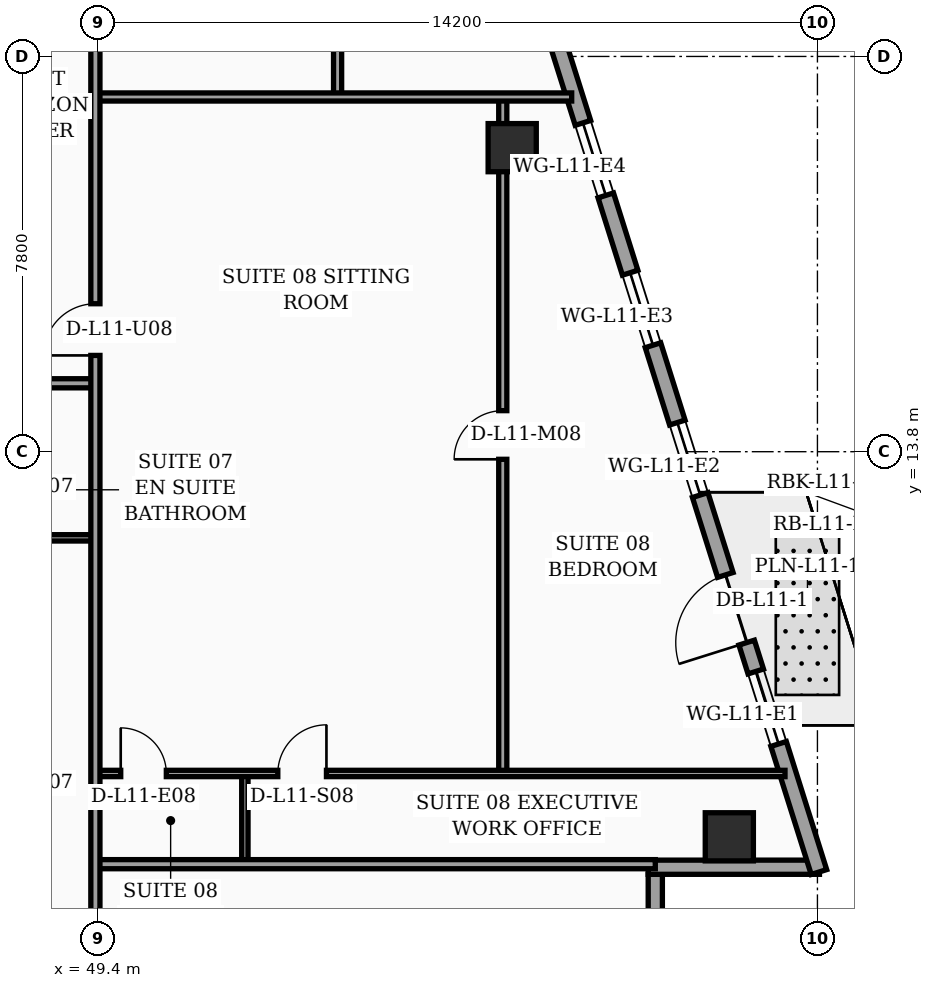
"""IFC4 building model, lengths in metres.
Left out: names, types, materials, properties, quantities, classifications, styles, units other than length and angle.
Written with IfcOpenShell. Run it as: python <this file> out.ifc"""

import sys

from ifc_helpers import new_model, si_unit, direction, frame, frame_2d, origin, origin_2d, place, context, subcontext, project, spatial, rectangle, hollow_rectangle, extrude, element, fill, save


model = new_model("IFC4")
c1 = context("Model", 3, precision=1e-05, world=origin(), true_north=direction((0.0, 1.0)))
c2 = subcontext(c1, "Body", "Model", "MODEL_VIEW")
j1 = project(units=[si_unit("LENGTHUNIT", "METRE"), si_unit("PLANEANGLEUNIT", "RADIAN")], contexts=[c1])
p1 = place(None, origin())
s1 = spatial("IfcSite", under=j1, at=p1, CompositionType="ELEMENT")
p2 = place(p1, origin())
s2 = spatial("IfcBuilding", under=s1, at=p2, CompositionType="ELEMENT")
p3 = place(p2, frame((0.0, 0.0, 50.8)))
s3 = spatial("IfcBuildingStorey", under=s2, at=p3, CompositionType="ELEMENT", Elevation=50.8)
for number, where, z_axis, x_axis in (
    (1, (61.861, 6.2, 0.0), (0.0, 0.0, 1.0), (1.0, 0.0, 0.0)),
    (2, (57.576, 19.8, 0.0), (0.0, 0.0, 1.0), (1.0, 0.0, 0.0)),
):
    element("IfcColumn", number, at=place(p3, frame(where, z_axis=z_axis, x_axis=x_axis)), inside=s3, PredefinedType="COLUMN", context=c2, shape_type="SweptSolid", body=[
        extrude(hollow_rectangle(XDim=0.95, YDim=0.95, WallThickness=0.04, at=origin_2d()), origin(), (0.0, 0.0, 1.0), 3.56),
    ])
p4 = place(p3, frame((60.4, 2.52, 0.0), z_axis=(0.0, 0.0, 1.0), x_axis=(0.0, 1.0, 0.0)))
e3 = element("IfcWall", 3, at=p4, inside=s3, PredefinedType="SOLIDWALL", context=c2, shape_type="SweptSolid", body=[
    extrude(rectangle(XDim=2.94, YDim=0.28, at=frame_2d((1.47, 0.0))), origin(), (0.0, 0.0, 1.0), 3.04),
])
p5 = place(p3, frame((60.26, 5.6, 0.0), z_axis=(0.0, 0.0, 1.0), x_axis=(1.0, 0.0, 0.0)))
e4 = element("IfcWall", 4, at=p5, inside=s3, PredefinedType="SOLIDWALL", context=c2, shape_type="SweptSolid", body=[
    extrude(rectangle(XDim=3.38, YDim=0.28, at=frame_2d((1.69, 0.0))), origin(), (0.0, 0.0, 1.0), 3.04),
])
p6 = place(p3, frame((63.63, 5.505, 0.0), z_axis=(0.0, 0.0, 1.0), x_axis=(-0.300501856448, 0.953781229775, 0.0)))
e5 = element("IfcWall", 5, at=p6, inside=s3, PredefinedType="SOLIDWALL", context=c2, shape_type="SweptSolid", body=[
    extrude(rectangle(XDim=30.814, YDim=0.32, at=frame_2d((15.407, 0.0))), origin(), (0.0, 0.0, 1.0), 3.56),
])
p7 = place(p6, frame((4.747, 0.0, 0.0)))
e6 = element("IfcOpeningElement", 6, at=p7, cuts=e5, PredefinedType="OPENING", context=c2, shape_type="SweptSolid", body=[
    extrude(rectangle(XDim=1.4, YDim=2.25, at=frame_2d((0.7, 1.125))), frame((0.0, 0.17, 0.0), z_axis=(0.0, -1.0, 0.0), x_axis=(1.0, 0.0, 0.0)), (0.0, 0.0, 1.0), 0.34),
])
p8 = place(p6, frame((2.65, 0.0, 0.75)))
e7 = element("IfcOpeningElement", 7, at=p8, cuts=e5, PredefinedType="OPENING", context=c2, shape_type="SweptSolid", body=[
    extrude(rectangle(XDim=1.5, YDim=1.6, at=frame_2d((0.75, 0.8))), frame((0.0, 0.17, 0.0), z_axis=(0.0, -1.0, 0.0), x_axis=(1.0, 0.0, 0.0)), (0.0, 0.0, 1.0), 0.34),
])
p9 = place(p6, frame((7.8, 0.0, 0.75)))
e8 = element("IfcOpeningElement", 8, at=p9, cuts=e5, PredefinedType="OPENING", context=c2, shape_type="SweptSolid", body=[
    extrude(rectangle(XDim=1.5, YDim=1.6, at=frame_2d((0.75, 0.8))), frame((0.0, 0.17, 0.0), z_axis=(0.0, -1.0, 0.0), x_axis=(1.0, 0.0, 0.0)), (0.0, 0.0, 1.0), 0.34),
])
p10 = place(p6, frame((10.9, 0.0, 0.75)))
e9 = element("IfcOpeningElement", 9, at=p10, cuts=e5, PredefinedType="OPENING", context=c2, shape_type="SweptSolid", body=[
    extrude(rectangle(XDim=1.5, YDim=1.6, at=frame_2d((0.75, 0.8))), frame((0.0, 0.17, 0.0), z_axis=(0.0, -1.0, 0.0), x_axis=(1.0, 0.0, 0.0)), (0.0, 0.0, 1.0), 0.34),
])
p11 = place(p6, frame((14.0, 0.0, 0.75)))
e10 = element("IfcOpeningElement", 10, at=p11, cuts=e5, PredefinedType="OPENING", context=c2, shape_type="SweptSolid", body=[
    extrude(rectangle(XDim=1.5, YDim=1.6, at=frame_2d((0.75, 0.8))), frame((0.0, 0.17, 0.0), z_axis=(0.0, -1.0, 0.0), x_axis=(1.0, 0.0, 0.0)), (0.0, 0.0, 1.0), 0.34),
])
p12 = place(p6, frame((17.1, 0.0, 0.75)))
e11 = element("IfcOpeningElement", 11, at=p12, cuts=e5, PredefinedType="OPENING", context=c2, shape_type="SweptSolid", body=[
    extrude(rectangle(XDim=1.5, YDim=1.6, at=frame_2d((0.75, 0.8))), frame((0.0, 0.17, 0.0), z_axis=(0.0, -1.0, 0.0), x_axis=(1.0, 0.0, 0.0)), (0.0, 0.0, 1.0), 0.34),
])
p13 = place(p6, frame((20.2, 0.0, 0.75)))
e12 = element("IfcOpeningElement", 12, at=p13, cuts=e5, PredefinedType="OPENING", context=c2, shape_type="SweptSolid", body=[
    extrude(rectangle(XDim=1.5, YDim=1.6, at=frame_2d((0.75, 0.8))), frame((0.0, 0.17, 0.0), z_axis=(0.0, -1.0, 0.0), x_axis=(1.0, 0.0, 0.0)), (0.0, 0.0, 1.0), 0.34),
])
p14 = place(p6, frame((26.4, 0.0, 0.75)))
e13 = element("IfcOpeningElement", 13, at=p14, cuts=e5, PredefinedType="OPENING", context=c2, shape_type="SweptSolid", body=[
    extrude(rectangle(XDim=1.5, YDim=1.6, at=frame_2d((0.75, 0.8))), frame((0.0, 0.17, 0.0), z_axis=(0.0, -1.0, 0.0), x_axis=(1.0, 0.0, 0.0)), (0.0, 0.0, 1.0), 0.34),
])
p15 = place(p3, frame((47.42, 12.1, 0.0), z_axis=(0.0, 0.0, 1.0), x_axis=(1.0, 0.0, 0.0)))
e14 = element("IfcWall", 14, at=p15, inside=s3, PredefinedType="PARTITIONING", context=c2, shape_type="SweptSolid", body=[
    extrude(rectangle(XDim=1.93, YDim=0.125, at=frame_2d((0.965, 0.0))), origin(), (0.0, 0.0, 1.0), 2.84),
])
p16 = place(p3, frame((32.4, 15.15, 0.0), z_axis=(0.0, 0.0, 1.0), x_axis=(1.0, 0.0, 0.0)))
e15 = element("IfcWall", 15, at=p16, inside=s3, PredefinedType="PARTITIONING", context=c2, shape_type="SweptSolid", body=[
    extrude(rectangle(XDim=16.95, YDim=0.18, at=frame_2d((8.475, 0.0))), origin(), (0.0, 0.0, 1.0), 2.84),
])
p17 = place(p16, frame((1.99, 0.0, 0.0)))
e16 = element("IfcOpeningElement", 16, at=p17, cuts=e15, PredefinedType="OPENING", context=c2, shape_type="SweptSolid", body=[
    extrude(rectangle(XDim=1.02, YDim=2.2, at=frame_2d((0.51, 1.1))), frame((0.0, 0.1, 0.0), z_axis=(0.0, -1.0, 0.0), x_axis=(1.0, 0.0, 0.0)), (0.0, 0.0, 1.0), 0.2),
])
p18 = place(p16, frame((7.58, 0.0, 0.0)))
e17 = element("IfcOpeningElement", 17, at=p18, cuts=e15, PredefinedType="OPENING", context=c2, shape_type="SweptSolid", body=[
    extrude(rectangle(XDim=1.02, YDim=2.2, at=frame_2d((0.51, 1.1))), frame((0.0, 0.1, 0.0), z_axis=(0.0, -1.0, 0.0), x_axis=(1.0, 0.0, 0.0)), (0.0, 0.0, 1.0), 0.2),
])
p19 = place(p16, frame((12.69, 0.0, 0.0)))
e18 = element("IfcOpeningElement", 18, at=p19, cuts=e15, PredefinedType="OPENING", context=c2, shape_type="SweptSolid", body=[
    extrude(rectangle(XDim=1.02, YDim=2.2, at=frame_2d((0.51, 1.1))), frame((0.0, 0.1, 0.0), z_axis=(0.0, -1.0, 0.0), x_axis=(1.0, 0.0, 0.0)), (0.0, 0.0, 1.0), 0.2),
])
p20 = place(p3, frame((52.3, 5.66, 0.0), z_axis=(0.0, 0.0, 1.0), x_axis=(0.0, 1.0, 0.0)))
e19 = element("IfcWall", 19, at=p20, inside=s3, PredefinedType="PARTITIONING", context=c2, shape_type="SweptSolid", body=[
    extrude(rectangle(XDim=1.79, YDim=0.125, at=frame_2d((0.895, 0.0))), origin(), (0.0, 0.0, 1.0), 3.56),
])
p21 = place(p3, frame((57.39, 7.45, 0.0), z_axis=(0.0, 0.0, 1.0), x_axis=(0.0, 1.0, 0.0)))
e20 = element("IfcWall", 20, at=p21, inside=s3, PredefinedType="PARTITIONING", context=c2, shape_type="SweptSolid", body=[
    extrude(rectangle(XDim=13.35, YDim=0.16, at=frame_2d((6.675, 0.0))), origin(), (0.0, 0.0, 1.0), 2.84),
])
p22 = place(p21, frame((6.2, 0.0, 0.0)))
e21 = element("IfcOpeningElement", 21, at=p22, cuts=e20, PredefinedType="OPENING", context=c2, shape_type="SweptSolid", body=[
    extrude(rectangle(XDim=0.96, YDim=2.2, at=frame_2d((0.48, 1.1))), frame((0.0, 0.09, 0.0), z_axis=(0.0, -1.0, 0.0), x_axis=(1.0, 0.0, 0.0)), (0.0, 0.0, 1.0), 0.18),
])
p23 = place(p3, frame((49.35, 7.45, 0.0), z_axis=(0.0, 0.0, 1.0), x_axis=(1.0, 0.0, 0.0)))
e22 = element("IfcWall", 22, at=p23, inside=s3, PredefinedType="PARTITIONING", context=c2, shape_type="SweptSolid", body=[
    extrude(rectangle(XDim=13.61, YDim=0.125, at=frame_2d((6.805, 0.0))), origin(), (0.0, 0.0, 1.0), 3.04),
])
p24 = place(p23, frame((0.5, 0.0, 0.0)))
e23 = element("IfcOpeningElement", 23, at=p24, cuts=e22, PredefinedType="OPENING", context=c2, shape_type="SweptSolid", body=[
    extrude(rectangle(XDim=0.9, YDim=2.15, at=frame_2d((0.45, 1.075))), frame((0.0, 0.073, 0.0), z_axis=(0.0, -1.0, 0.0), x_axis=(1.0, 0.0, 0.0)), (0.0, 0.0, 1.0), 0.145),
])
p25 = place(p23, frame((3.6, 0.0, 0.0)))
e24 = element("IfcOpeningElement", 24, at=p25, cuts=e22, PredefinedType="OPENING", context=c2, shape_type="SweptSolid", body=[
    extrude(rectangle(XDim=0.96, YDim=2.2, at=frame_2d((0.48, 1.1))), frame((0.0, 0.073, 0.0), z_axis=(0.0, -1.0, 0.0), x_axis=(1.0, 0.0, 0.0)), (0.0, 0.0, 1.0), 0.145),
])
p26 = place(p3, frame((49.35, 5.66, 0.0), z_axis=(0.0, 0.0, 1.0), x_axis=(1.0, 0.0, 0.0)))
e25 = element("IfcWall", 25, at=p26, inside=s3, PredefinedType="PARTITIONING", context=c2, shape_type="SweptSolid", body=[
    extrude(rectangle(XDim=11.05, YDim=0.18, at=frame_2d((5.525, 0.0))), origin(), (0.0, 0.0, 1.0), 2.84),
])
p27 = place(p3, frame((54.13, 20.8, 0.0), z_axis=(0.0, 0.0, 1.0), x_axis=(0.0, 1.0, 0.0)))
e26 = element("IfcWall", 26, at=p27, inside=s3, PredefinedType="PARTITIONING", context=c2, shape_type="SweptSolid", body=[
    extrude(rectangle(XDim=7.35, YDim=0.16, at=frame_2d((3.675, 0.0))), origin(), (0.0, 0.0, 1.0), 3.19),
])
p28 = place(p27, frame((3.19, 0.0, 0.0)))
e27 = element("IfcOpeningElement", 27, at=p28, cuts=e26, PredefinedType="OPENING", context=c2, shape_type="SweptSolid", body=[
    extrude(rectangle(XDim=0.96, YDim=2.2, at=frame_2d((0.48, 1.1))), frame((0.0, 0.09, 0.0), z_axis=(0.0, -1.0, 0.0), x_axis=(1.0, 0.0, 0.0)), (0.0, 0.0, 1.0), 0.18),
])
p29 = place(p3, frame((49.35, 20.8, 0.0), z_axis=(0.0, 0.0, 1.0), x_axis=(1.0, 0.0, 0.0)))
e28 = element("IfcWall", 28, at=p29, inside=s3, PredefinedType="PARTITIONING", context=c2, shape_type="SweptSolid", body=[
    extrude(rectangle(XDim=9.4, YDim=0.16, at=frame_2d((4.7, 0.0))), origin(), (0.0, 0.0, 1.0), 3.04),
])
p30 = place(p3, frame((49.35, 2.44, 0.0), z_axis=(0.0, 0.0, 1.0), x_axis=(0.0, 1.0, 0.0)))
e29 = element("IfcWall", 29, at=p30, inside=s3, PredefinedType="PARTITIONING", context=c2, shape_type="SweptSolid", body=[
    extrude(rectangle(XDim=27.84, YDim=0.18, at=frame_2d((13.92, 0.0))), origin(), (0.0, 0.0, 1.0), 2.84),
])
p31 = place(p30, frame((13.26, 0.0, 0.0)))
e30 = element("IfcOpeningElement", 30, at=p31, cuts=e29, PredefinedType="OPENING", context=c2, shape_type="SweptSolid", body=[
    extrude(rectangle(XDim=1.02, YDim=2.2, at=frame_2d((0.51, 1.1))), frame((0.0, 0.1, 0.0), z_axis=(0.0, -1.0, 0.0), x_axis=(1.0, 0.0, 0.0)), (0.0, 0.0, 1.0), 0.2),
])
p32 = place(p30, frame((21.52, 0.0, 0.0)))
e31 = element("IfcOpeningElement", 31, at=p32, cuts=e29, PredefinedType="OPENING", context=c2, shape_type="SweptSolid", body=[
    extrude(rectangle(XDim=1.02, YDim=2.2, at=frame_2d((0.51, 1.1))), frame((0.0, 0.1, 0.0), z_axis=(0.0, -1.0, 0.0), x_axis=(1.0, 0.0, 0.0)), (0.0, 0.0, 1.0), 0.2),
])
p33 = place(p7, origin())
e32 = element("IfcDoor", 32, at=p33, inside=s3, OperationType="SINGLE_SWING_LEFT", PredefinedType="DOOR", context=c2, shape_type="SweptSolid", body=[
    extrude(rectangle(XDim=1.4, YDim=2.25, at=frame_2d((0.7, 1.125))), frame((0.0, 0.025, 0.0), z_axis=(0.0, -1.0, 0.0), x_axis=(1.0, 0.0, 0.0)), (0.0, 0.0, 1.0), 0.05),
])
fill(e6, e32)
p34 = place(p8, origin())
e33 = element("IfcWindow", 33, at=p34, inside=s3, PartitioningType="SINGLE_PANEL", PredefinedType="WINDOW", context=c2, shape_type="SweptSolid", body=[
    extrude(rectangle(XDim=1.5, YDim=1.6, at=frame_2d((0.75, 0.8))), frame((0.0, 0.03, 0.0), z_axis=(0.0, -1.0, 0.0), x_axis=(1.0, 0.0, 0.0)), (0.0, 0.0, 1.0), 0.06),
])
fill(e7, e33)
p35 = place(p9, origin())
e34 = element("IfcWindow", 34, at=p35, inside=s3, PartitioningType="SINGLE_PANEL", PredefinedType="WINDOW", context=c2, shape_type="SweptSolid", body=[
    extrude(rectangle(XDim=1.5, YDim=1.6, at=frame_2d((0.75, 0.8))), frame((0.0, 0.03, 0.0), z_axis=(0.0, -1.0, 0.0), x_axis=(1.0, 0.0, 0.0)), (0.0, 0.0, 1.0), 0.06),
])
fill(e8, e34)
p36 = place(p10, origin())
e35 = element("IfcWindow", 35, at=p36, inside=s3, PartitioningType="SINGLE_PANEL", PredefinedType="WINDOW", context=c2, shape_type="SweptSolid", body=[
    extrude(rectangle(XDim=1.5, YDim=1.6, at=frame_2d((0.75, 0.8))), frame((0.0, 0.03, 0.0), z_axis=(0.0, -1.0, 0.0), x_axis=(1.0, 0.0, 0.0)), (0.0, 0.0, 1.0), 0.06),
])
fill(e9, e35)
p37 = place(p11, origin())
e36 = element("IfcWindow", 36, at=p37, inside=s3, PartitioningType="SINGLE_PANEL", PredefinedType="WINDOW", context=c2, shape_type="SweptSolid", body=[
    extrude(rectangle(XDim=1.5, YDim=1.6, at=frame_2d((0.75, 0.8))), frame((0.0, 0.03, 0.0), z_axis=(0.0, -1.0, 0.0), x_axis=(1.0, 0.0, 0.0)), (0.0, 0.0, 1.0), 0.06),
])
fill(e10, e36)
p38 = place(p22, origin())
e37 = element("IfcDoor", 37, at=p38, inside=s3, OperationType="SINGLE_SWING_LEFT", PredefinedType="DOOR", context=c2, shape_type="SweptSolid", body=[
    extrude(rectangle(XDim=0.96, YDim=2.2, at=frame_2d((0.48, 1.1))), frame((0.0, 0.025, 0.0), z_axis=(0.0, -1.0, 0.0), x_axis=(1.0, 0.0, 0.0)), (0.0, 0.0, 1.0), 0.05),
])
fill(e21, e37)
p39 = place(p24, origin())
e38 = element("IfcDoor", 38, at=p39, inside=s3, OperationType="SINGLE_SWING_LEFT", PredefinedType="DOOR", context=c2, shape_type="SweptSolid", body=[
    extrude(rectangle(XDim=0.9, YDim=2.15, at=frame_2d((0.45, 1.075))), frame((0.0, 0.025, 0.0), z_axis=(0.0, -1.0, 0.0), x_axis=(1.0, 0.0, 0.0)), (0.0, 0.0, 1.0), 0.05),
])
fill(e23, e38)
p40 = place(p25, origin())
e39 = element("IfcDoor", 39, at=p40, inside=s3, OperationType="SINGLE_SWING_RIGHT", PredefinedType="DOOR", context=c2, shape_type="SweptSolid", body=[
    extrude(rectangle(XDim=0.96, YDim=2.2, at=frame_2d((0.48, 1.1))), frame((0.0, 0.025, 0.0), z_axis=(0.0, -1.0, 0.0), x_axis=(1.0, 0.0, 0.0)), (0.0, 0.0, 1.0), 0.05),
])
fill(e24, e39)
p41 = place(p31, origin())
e40 = element("IfcDoor", 40, at=p41, inside=s3, OperationType="SINGLE_SWING_LEFT", PredefinedType="DOOR", context=c2, shape_type="SweptSolid", body=[
    extrude(rectangle(XDim=1.02, YDim=2.2, at=frame_2d((0.51, 1.1))), frame((0.0, 0.025, 0.0), z_axis=(0.0, -1.0, 0.0), x_axis=(1.0, 0.0, 0.0)), (0.0, 0.0, 1.0), 0.05),
])
fill(e30, e40)
save(model, sys.argv[1])
